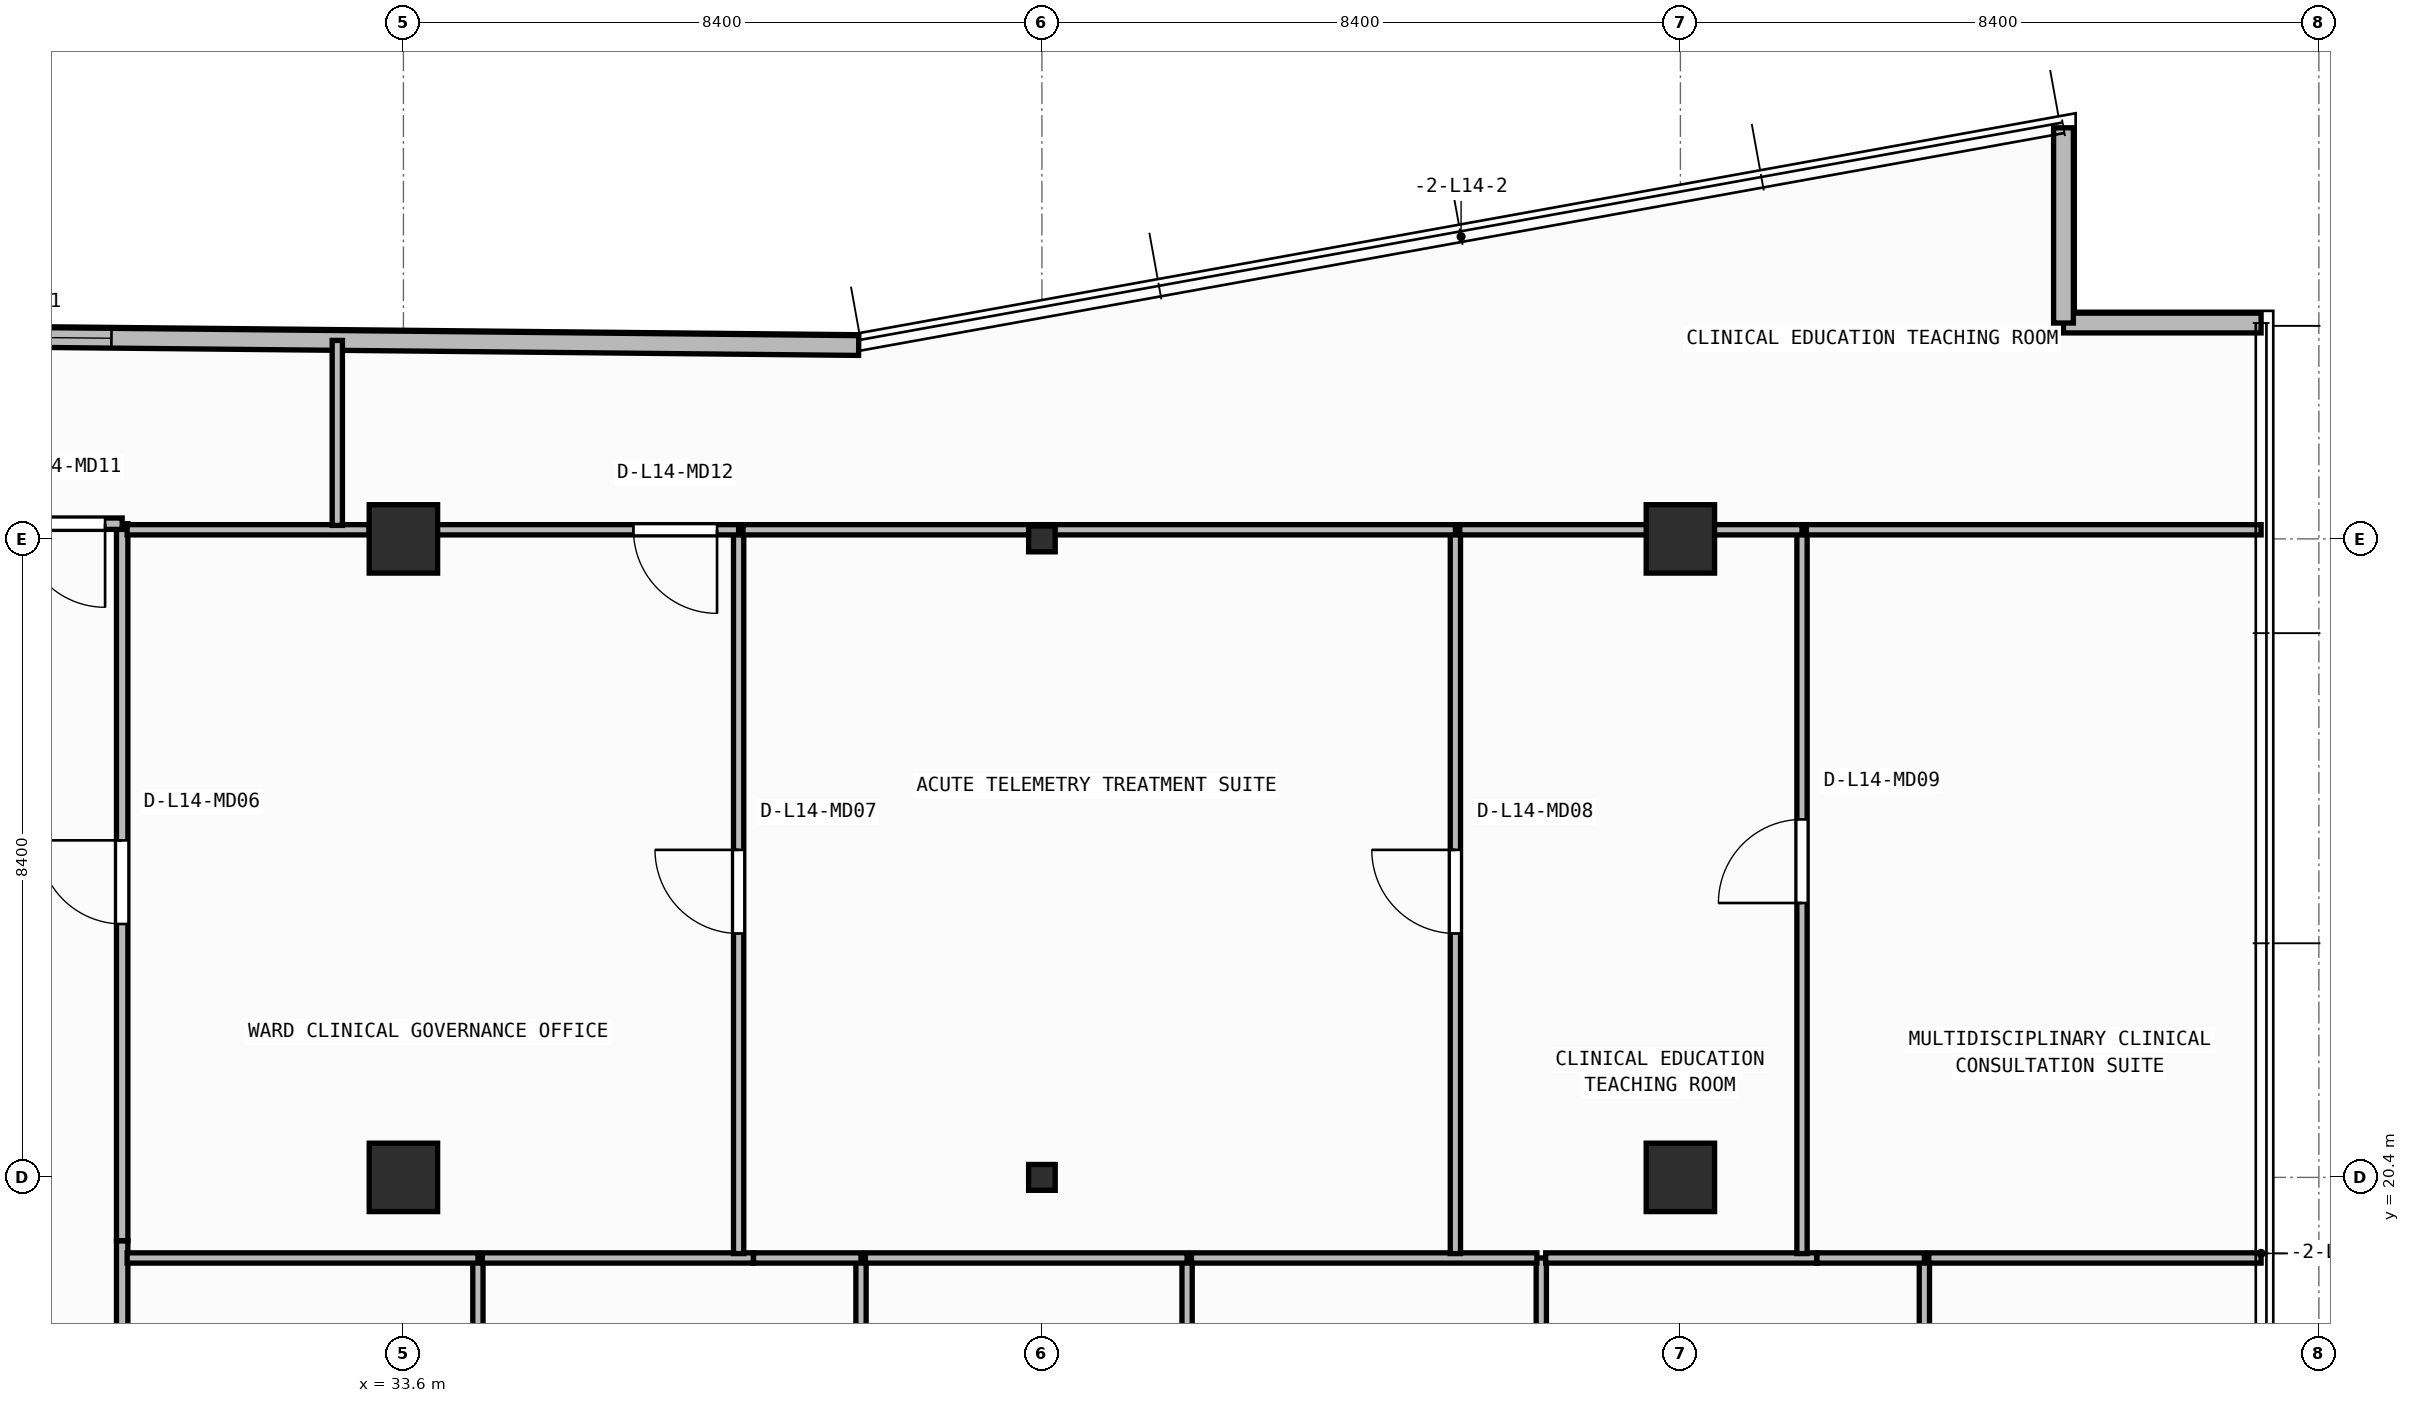
"""IFC4 building model, lengths in metres.
Left out: names, types, materials, properties, quantities, classifications, styles, units other than length and angle.
Written with IfcOpenShell. Run it as: python <this file> out.ifc"""

import sys

from ifc_helpers import new_model, si_unit, direction, frame, frame_2d, origin, origin_2d, place, context, subcontext, project, spatial, rectangle, i_section, extrude, element, fill, save


model = new_model("IFC4")
c1 = context("Model", 3, precision=1e-05, world=origin(), true_north=direction((0.0, 1.0)))
c2 = subcontext(c1, "Body", "Model", "MODEL_VIEW")
j1 = project(units=[si_unit("LENGTHUNIT", "METRE"), si_unit("PLANEANGLEUNIT", "RADIAN")], contexts=[c1])
p1 = place(None, origin())
s1 = spatial("IfcSite", under=j1, at=p1, CompositionType="ELEMENT")
p2 = place(p1, origin())
s2 = spatial("IfcBuilding", under=s1, at=p2, CompositionType="ELEMENT")
p3 = place(p2, frame((0.0, 0.0, 58.05)))
s3 = spatial("IfcBuildingStorey", under=s2, at=p3, CompositionType="ELEMENT", Elevation=58.05)
p4 = place(p3, frame((33.6, 20.4, 0.0), z_axis=(0.0, 0.0, 1.0), x_axis=(1.0, 0.0, 0.0)))
e1 = element("IfcColumn", 1, at=p4, inside=s3, PredefinedType="COLUMN", context=c2, shape_type="SweptSolid", body=[
    extrude(rectangle(XDim=0.9, YDim=0.9, at=origin_2d()), origin(), (0.0, 0.0, 1.0), 3.95),
])
p5 = place(p3, frame((42.0, 20.4, 0.0), z_axis=(0.0, 0.0, 1.0), x_axis=(1.0, 0.0, 0.0)))
e2 = element("IfcColumn", 2, at=p5, inside=s3, PredefinedType="COLUMN", context=c2, shape_type="SweptSolid", body=[
    extrude(i_section(OverallWidth=0.35, OverallDepth=0.34, WebThickness=0.016, FlangeThickness=0.028, at=origin_2d()), origin(), (0.0, 0.0, 1.0), 3.95),
])
for number, where, z_axis, x_axis in (
    (3, (50.4, 20.4, 0.0), (0.0, 0.0, 1.0), (1.0, 0.0, 0.0)),
    (4, (33.6, 28.8, 0.0), (0.0, 0.0, 1.0), (1.0, 0.0, 0.0)),
):
    element("IfcColumn", number, at=place(p3, frame(where, z_axis=z_axis, x_axis=x_axis)), inside=s3, PredefinedType="COLUMN", context=c2, shape_type="SweptSolid", body=[
        extrude(rectangle(XDim=0.9, YDim=0.9, at=origin_2d()), origin(), (0.0, 0.0, 1.0), 3.95),
    ])
p6 = place(p3, frame((42.0, 28.8, 0.0), z_axis=(0.0, 0.0, 1.0), x_axis=(1.0, 0.0, 0.0)))
e5 = element("IfcColumn", 5, at=p6, inside=s3, PredefinedType="COLUMN", context=c2, shape_type="SweptSolid", body=[
    extrude(i_section(OverallWidth=0.35, OverallDepth=0.34, WebThickness=0.016, FlangeThickness=0.028, at=origin_2d()), origin(), (0.0, 0.0, 1.0), 3.95),
])
p7 = place(p3, frame((50.4, 28.8, 0.0), z_axis=(0.0, 0.0, 1.0), x_axis=(1.0, 0.0, 0.0)))
e6 = element("IfcColumn", 6, at=p7, inside=s3, PredefinedType="COLUMN", context=c2, shape_type="SweptSolid", body=[
    extrude(rectangle(XDim=0.9, YDim=0.9, at=origin_2d()), origin(), (0.0, 0.0, 1.0), 3.95),
])
p8 = place(p3, frame((58.04, 31.64, 0.0), z_axis=(0.0, 0.0, 1.0), x_axis=(-1.0, 0.0, 0.0)))
e7 = element("IfcWall", 7, at=p8, inside=s3, PredefinedType="STANDARD", context=c2, shape_type="SweptSolid", body=[
    extrude(rectangle(XDim=2.6, YDim=0.26, at=frame_2d((1.3, 0.0))), origin(), (0.0, 0.0, 1.0), 3.71),
])
p9 = place(p3, frame((55.44, 31.64, 0.0), z_axis=(0.0, 0.0, 1.0), x_axis=(0.0, 1.0, 0.0)))
e8 = element("IfcWall", 8, at=p9, inside=s3, PredefinedType="STANDARD", context=c2, shape_type="SweptSolid", body=[
    extrude(rectangle(XDim=2.569, YDim=0.26, at=frame_2d((1.284, 0.0))), origin(), (0.0, 0.0, 1.0), 3.71),
])
p10 = place(p3, frame((39.59, 31.344, 0.0), z_axis=(0.0, 0.0, 1.0), x_axis=(-0.999952362926, 0.009760731435, 0.0)))
e9 = element("IfcWall", 9, at=p10, inside=s3, PredefinedType="STANDARD", context=c2, shape_type="SweptSolid", body=[
    extrude(rectangle(XDim=15.183, YDim=0.26, at=frame_2d((7.591, 0.0))), origin(), (0.0, 0.0, 1.0), 3.71),
])
p11 = place(p10, frame((9.831, 0.0, 0.9)))
e10 = element("IfcOpeningElement", 10, at=p11, cuts=e9, PredefinedType="OPENING", context=c2, shape_type="SweptSolid", body=[
    extrude(rectangle(XDim=2.4, YDim=1.65, at=frame_2d((1.2, 0.825))), frame((0.0, 0.14, 0.0), z_axis=(0.0, -1.0, 0.0), x_axis=(1.0, 0.0, 0.0)), (0.0, 0.0, 1.0), 0.28),
])
p12 = place(p3, frame((29.9, 17.814, 0.0), z_axis=(0.0, 0.0, 1.0), x_axis=(0.0, 1.0, 0.0)))
e11 = element("IfcWall", 11, at=p12, inside=s3, PredefinedType="PARTITIONING", context=c2, shape_type="SweptSolid", body=[
    extrude(rectangle(XDim=1.752, YDim=0.15, at=frame_2d((0.876, 0.0))), origin(), (0.0, 0.0, 1.0), 3.71),
])
p13 = place(p3, frame((29.9, 19.568, 0.0), z_axis=(0.0, 0.0, 1.0), x_axis=(0.0, 1.0, 0.0)))
e12 = element("IfcWall", 12, at=p13, inside=s3, PredefinedType="PARTITIONING", context=c2, shape_type="SweptSolid", body=[
    extrude(rectangle(XDim=9.432, YDim=0.15, at=frame_2d((4.716, 0.0))), origin(), (0.0, 0.0, 1.0), 3.71),
])
p14 = place(p13, frame((4.166, 0.0, 0.0)))
e13 = element("IfcOpeningElement", 13, at=p14, cuts=e12, PredefinedType="OPENING", context=c2, shape_type="SweptSolid", body=[
    extrude(rectangle(XDim=1.1, YDim=2.1, at=frame_2d((0.55, 1.05))), frame((0.0, 0.085, 0.0), z_axis=(0.0, -1.0, 0.0), x_axis=(1.0, 0.0, 0.0)), (0.0, 0.0, 1.0), 0.17),
])
p15 = place(p3, frame((29.9, 29.0, 0.0), z_axis=(0.0, 0.0, 1.0), x_axis=(-1.0, 0.0, 0.0)))
e14 = element("IfcWall", 14, at=p15, inside=s3, PredefinedType="PARTITIONING", context=c2, shape_type="SweptSolid", body=[
    extrude(rectangle(XDim=2.5, YDim=0.15, at=frame_2d((1.25, 0.0))), origin(), (0.0, 0.0, 1.0), 3.279),
])
p16 = place(p15, frame((0.225, 0.0, 0.0)))
e15 = element("IfcOpeningElement", 15, at=p16, cuts=e14, PredefinedType="OPENING", context=c2, shape_type="SweptSolid", body=[
    extrude(rectangle(XDim=1.1, YDim=2.1, at=frame_2d((0.55, 1.05))), frame((0.0, 0.085, 0.0), z_axis=(0.0, -1.0, 0.0), x_axis=(1.0, 0.0, 0.0)), (0.0, 0.0, 1.0), 0.17),
])
p17 = place(p3, frame((34.58, 17.833, 0.0), z_axis=(0.0, 0.0, 1.0), x_axis=(0.0, 1.0, 0.0)))
e16 = element("IfcWall", 16, at=p17, inside=s3, PredefinedType="PARTITIONING", context=c2, shape_type="SweptSolid", body=[
    extrude(rectangle(XDim=1.508, YDim=0.135, at=frame_2d((0.754, 0.0))), origin(), (0.0, 0.0, 1.0), 3.71),
])
p18 = place(p3, frame((34.58, 19.34, 0.0), z_axis=(0.0, 0.0, 1.0), x_axis=(-1.0, 0.0, 0.0)))
e17 = element("IfcWall", 17, at=p18, inside=s3, PredefinedType="PARTITIONING", context=c2, shape_type="SweptSolid", body=[
    extrude(rectangle(XDim=4.615, YDim=0.135, at=frame_2d((2.308, 0.0))), origin(), (0.0, 0.0, 1.0), 3.71),
])
p19 = place(p3, frame((39.62, 17.833, 0.0), z_axis=(0.0, 0.0, 1.0), x_axis=(0.0, 1.0, 0.0)))
e18 = element("IfcWall", 18, at=p19, inside=s3, PredefinedType="PARTITIONING", context=c2, shape_type="SweptSolid", body=[
    extrude(rectangle(XDim=1.508, YDim=0.135, at=frame_2d((0.754, 0.0))), origin(), (0.0, 0.0, 1.0), 3.71),
])
p20 = place(p3, frame((38.205, 19.34, 0.0), z_axis=(0.0, 0.0, 1.0), x_axis=(-1.0, 0.0, 0.0)))
e19 = element("IfcWall", 19, at=p20, inside=s3, PredefinedType="PARTITIONING", context=c2, shape_type="SweptSolid", body=[
    extrude(rectangle(XDim=3.567, YDim=0.135, at=frame_2d((1.784, 0.0))), origin(), (0.0, 0.0, 1.0), 3.71),
])
p21 = place(p3, frame((39.62, 19.34, 0.0), z_axis=(0.0, 0.0, 1.0), x_axis=(-1.0, 0.0, 0.0)))
e20 = element("IfcWall", 20, at=p21, inside=s3, PredefinedType="PARTITIONING", context=c2, shape_type="SweptSolid", body=[
    extrude(rectangle(XDim=1.414, YDim=0.135, at=frame_2d((0.707, 0.0))), origin(), (0.0, 0.0, 1.0), 3.71),
])
p22 = place(p3, frame((43.91, 17.833, 0.0), z_axis=(0.0, 0.0, 1.0), x_axis=(0.0, 1.0, 0.0)))
e21 = element("IfcWall", 21, at=p22, inside=s3, PredefinedType="PARTITIONING", context=c2, shape_type="SweptSolid", body=[
    extrude(rectangle(XDim=1.508, YDim=0.135, at=frame_2d((0.754, 0.0))), origin(), (0.0, 0.0, 1.0), 3.71),
])
p23 = place(p3, frame((43.91, 19.34, 0.0), z_axis=(0.0, 0.0, 1.0), x_axis=(-1.0, 0.0, 0.0)))
e22 = element("IfcWall", 22, at=p23, inside=s3, PredefinedType="PARTITIONING", context=c2, shape_type="SweptSolid", body=[
    extrude(rectangle(XDim=4.232, YDim=0.135, at=frame_2d((2.116, 0.0))), origin(), (0.0, 0.0, 1.0), 3.71),
])
p24 = place(p3, frame((48.57, 17.833, 0.0), z_axis=(0.0, 0.0, 1.0), x_axis=(0.0, 1.0, 0.0)))
e23 = element("IfcWall", 23, at=p24, inside=s3, PredefinedType="PARTITIONING", context=c2, shape_type="SweptSolid", body=[
    extrude(rectangle(XDim=1.508, YDim=0.135, at=frame_2d((0.754, 0.0))), origin(), (0.0, 0.0, 1.0), 3.71),
])
p25 = place(p3, frame((48.512, 19.34, 0.0), z_axis=(0.0, 0.0, 1.0), x_axis=(-1.0, 0.0, 0.0)))
e24 = element("IfcWall", 24, at=p25, inside=s3, PredefinedType="PARTITIONING", context=c2, shape_type="SweptSolid", body=[
    extrude(rectangle(XDim=4.545, YDim=0.135, at=frame_2d((2.272, 0.0))), origin(), (0.0, 0.0, 1.0), 3.71),
])
p26 = place(p3, frame((53.61, 17.833, 0.0), z_axis=(0.0, 0.0, 1.0), x_axis=(0.0, 1.0, 0.0)))
e25 = element("IfcWall", 25, at=p26, inside=s3, PredefinedType="PARTITIONING", context=c2, shape_type="SweptSolid", body=[
    extrude(rectangle(XDim=1.508, YDim=0.135, at=frame_2d((0.754, 0.0))), origin(), (0.0, 0.0, 1.0), 3.71),
])
p27 = place(p3, frame((52.195, 19.34, 0.0), z_axis=(0.0, 0.0, 1.0), x_axis=(-1.0, 0.0, 0.0)))
e26 = element("IfcWall", 26, at=p27, inside=s3, PredefinedType="PARTITIONING", context=c2, shape_type="SweptSolid", body=[
    extrude(rectangle(XDim=3.567, YDim=0.135, at=frame_2d((1.784, 0.0))), origin(), (0.0, 0.0, 1.0), 3.71),
])
p28 = place(p3, frame((53.61, 19.34, 0.0), z_axis=(0.0, 0.0, 1.0), x_axis=(-1.0, 0.0, 0.0)))
e27 = element("IfcWall", 27, at=p28, inside=s3, PredefinedType="PARTITIONING", context=c2, shape_type="SweptSolid", body=[
    extrude(rectangle(XDim=1.414, YDim=0.135, at=frame_2d((0.707, 0.0))), origin(), (0.0, 0.0, 1.0), 3.71),
])
p29 = place(p3, frame((58.04, 19.34, 0.0), z_axis=(0.0, 0.0, 1.0), x_axis=(-1.0, 0.0, 0.0)))
e28 = element("IfcWall", 28, at=p29, inside=s3, PredefinedType="PARTITIONING", context=c2, shape_type="SweptSolid", body=[
    extrude(rectangle(XDim=4.373, YDim=0.135, at=frame_2d((2.186, 0.0))), origin(), (0.0, 0.0, 1.0), 3.71),
])
p30 = place(p3, frame((38.01, 19.397, 0.0), z_axis=(0.0, 0.0, 1.0), x_axis=(0.0, 1.0, 0.0)))
e29 = element("IfcWall", 29, at=p30, inside=s3, PredefinedType="PARTITIONING", context=c2, shape_type="SweptSolid", body=[
    extrude(rectangle(XDim=9.522, YDim=0.135, at=frame_2d((4.761, 0.0))), origin(), (0.0, 0.0, 1.0), 3.71),
])
p31 = place(p30, frame((4.211, 0.0, 0.0)))
e30 = element("IfcOpeningElement", 30, at=p31, cuts=e29, PredefinedType="OPENING", context=c2, shape_type="SweptSolid", body=[
    extrude(rectangle(XDim=1.1, YDim=2.1, at=frame_2d((0.55, 1.05))), frame((0.0, 0.077, 0.0), z_axis=(0.0, -1.0, 0.0), x_axis=(1.0, 0.0, 0.0)), (0.0, 0.0, 1.0), 0.155),
])
p32 = place(p3, frame((33.15, 28.92, 0.0), z_axis=(0.0, 0.0, 1.0), x_axis=(-1.0, 0.0, 0.0)))
e31 = element("IfcWall", 31, at=p32, inside=s3, PredefinedType="PARTITIONING", context=c2, shape_type="SweptSolid", body=[
    extrude(rectangle(XDim=3.185, YDim=0.135, at=frame_2d((1.592, 0.0))), origin(), (0.0, 0.0, 1.0), 3.279),
])
p33 = place(p3, frame((38.01, 28.92, 0.0), z_axis=(0.0, 0.0, 1.0), x_axis=(-1.0, 0.0, 0.0)))
e32 = element("IfcWall", 32, at=p33, inside=s3, PredefinedType="PARTITIONING", context=c2, shape_type="SweptSolid", body=[
    extrude(rectangle(XDim=4.858, YDim=0.135, at=frame_2d((2.429, 0.0))), origin(), (0.0, 0.0, 1.0), 3.279),
])
p34 = place(p33, frame((0.284, 0.0, 0.0)))
e33 = element("IfcOpeningElement", 33, at=p34, cuts=e32, PredefinedType="OPENING", context=c2, shape_type="SweptSolid", body=[
    extrude(rectangle(XDim=1.1, YDim=2.1, at=frame_2d((0.55, 1.05))), frame((0.0, 0.077, 0.0), z_axis=(0.0, -1.0, 0.0), x_axis=(1.0, 0.0, 0.0)), (0.0, 0.0, 1.0), 0.155),
])
p35 = place(p3, frame((47.44, 19.397, 0.0), z_axis=(0.0, 0.0, 1.0), x_axis=(0.0, 1.0, 0.0)))
e34 = element("IfcWall", 34, at=p35, inside=s3, PredefinedType="PARTITIONING", context=c2, shape_type="SweptSolid", body=[
    extrude(rectangle(XDim=9.522, YDim=0.135, at=frame_2d((4.761, 0.0))), origin(), (0.0, 0.0, 1.0), 3.71),
])
p36 = place(p35, frame((4.211, 0.0, 0.0)))
e35 = element("IfcOpeningElement", 35, at=p36, cuts=e34, PredefinedType="OPENING", context=c2, shape_type="SweptSolid", body=[
    extrude(rectangle(XDim=1.1, YDim=2.1, at=frame_2d((0.55, 1.05))), frame((0.0, 0.077, 0.0), z_axis=(0.0, -1.0, 0.0), x_axis=(1.0, 0.0, 0.0)), (0.0, 0.0, 1.0), 0.155),
])
p37 = place(p3, frame((47.44, 28.92, 0.0), z_axis=(0.0, 0.0, 1.0), x_axis=(-1.0, 0.0, 0.0)))
e36 = element("IfcWall", 36, at=p37, inside=s3, PredefinedType="PARTITIONING", context=c2, shape_type="SweptSolid", body=[
    extrude(rectangle(XDim=9.373, YDim=0.135, at=frame_2d((4.686, 0.0))), origin(), (0.0, 0.0, 1.0), 3.073),
])
p38 = place(p3, frame((52.0, 19.397, 0.0), z_axis=(0.0, 0.0, 1.0), x_axis=(0.0, 1.0, 0.0)))
e37 = element("IfcWall", 37, at=p38, inside=s3, PredefinedType="PARTITIONING", context=c2, shape_type="SweptSolid", body=[
    extrude(rectangle(XDim=9.522, YDim=0.135, at=frame_2d((4.761, 0.0))), origin(), (0.0, 0.0, 1.0), 3.71),
])
p39 = place(p38, frame((4.612, 0.0, 0.0)))
e38 = element("IfcOpeningElement", 38, at=p39, cuts=e37, PredefinedType="OPENING", context=c2, shape_type="SweptSolid", body=[
    extrude(rectangle(XDim=1.1, YDim=2.1, at=frame_2d((0.55, 1.05))), frame((0.0, 0.077, 0.0), z_axis=(0.0, -1.0, 0.0), x_axis=(1.0, 0.0, 0.0)), (0.0, 0.0, 1.0), 0.155),
])
p40 = place(p3, frame((52.0, 28.92, 0.0), z_axis=(0.0, 0.0, 1.0), x_axis=(-1.0, 0.0, 0.0)))
e39 = element("IfcWall", 39, at=p40, inside=s3, PredefinedType="PARTITIONING", context=c2, shape_type="SweptSolid", body=[
    extrude(rectangle(XDim=4.502, YDim=0.135, at=frame_2d((2.251, 0.0))), origin(), (0.0, 0.0, 1.0), 3.073),
])
p41 = place(p3, frame((58.04, 28.92, 0.0), z_axis=(0.0, 0.0, 1.0), x_axis=(-1.0, 0.0, 0.0)))
e40 = element("IfcWall", 40, at=p41, inside=s3, PredefinedType="PARTITIONING", context=c2, shape_type="SweptSolid", body=[
    extrude(rectangle(XDim=5.982, YDim=0.135, at=frame_2d((2.991, 0.0))), origin(), (0.0, 0.0, 1.0), 3.71),
])
p42 = place(p3, frame((32.73, 28.978, 0.0), z_axis=(0.0, 0.0, 1.0), x_axis=(0.0, 1.0, 0.0)))
e41 = element("IfcWall", 41, at=p42, inside=s3, PredefinedType="PARTITIONING", context=c2, shape_type="SweptSolid", body=[
    extrude(rectangle(XDim=2.433, YDim=0.135, at=frame_2d((1.217, 0.0))), origin(), (0.0, 0.0, 1.0), 3.71),
])
p43 = place(p11, origin())
e42 = element("IfcWindow", 42, at=p43, inside=s3, PartitioningType="SINGLE_PANEL", PredefinedType="WINDOW", context=c2, shape_type="SweptSolid", body=[
    extrude(rectangle(XDim=2.4, YDim=1.65, at=frame_2d((1.2, 0.825))), frame((0.0, 0.03, 0.0), z_axis=(0.0, -1.0, 0.0), x_axis=(1.0, 0.0, 0.0)), (0.0, 0.0, 1.0), 0.06),
])
fill(e10, e42)
p44 = place(p14, origin())
e43 = element("IfcDoor", 43, at=p44, inside=s3, OperationType="SINGLE_SWING_RIGHT", PredefinedType="DOOR", context=c2, shape_type="SweptSolid", body=[
    extrude(rectangle(XDim=1.1, YDim=2.1, at=frame_2d((0.55, 1.05))), frame((0.0, 0.025, 0.0), z_axis=(0.0, -1.0, 0.0), x_axis=(1.0, 0.0, 0.0)), (0.0, 0.0, 1.0), 0.05),
])
fill(e13, e43)
p45 = place(p16, origin())
e44 = element("IfcDoor", 44, at=p45, inside=s3, OperationType="SINGLE_SWING_LEFT", PredefinedType="DOOR", context=c2, shape_type="SweptSolid", body=[
    extrude(rectangle(XDim=1.1, YDim=2.1, at=frame_2d((0.55, 1.05))), frame((0.0, 0.025, 0.0), z_axis=(0.0, -1.0, 0.0), x_axis=(1.0, 0.0, 0.0)), (0.0, 0.0, 1.0), 0.05),
])
fill(e15, e44)
p46 = place(p31, origin())
e45 = element("IfcDoor", 45, at=p46, inside=s3, OperationType="SINGLE_SWING_RIGHT", PredefinedType="DOOR", context=c2, shape_type="SweptSolid", body=[
    extrude(rectangle(XDim=1.1, YDim=2.1, at=frame_2d((0.55, 1.05))), frame((0.0, 0.025, 0.0), z_axis=(0.0, -1.0, 0.0), x_axis=(1.0, 0.0, 0.0)), (0.0, 0.0, 1.0), 0.05),
])
fill(e30, e45)
p47 = place(p34, origin())
e46 = element("IfcDoor", 46, at=p47, inside=s3, OperationType="SINGLE_SWING_LEFT", PredefinedType="DOOR", context=c2, shape_type="SweptSolid", body=[
    extrude(rectangle(XDim=1.1, YDim=2.1, at=frame_2d((0.55, 1.05))), frame((0.0, 0.025, 0.0), z_axis=(0.0, -1.0, 0.0), x_axis=(1.0, 0.0, 0.0)), (0.0, 0.0, 1.0), 0.05),
])
fill(e33, e46)
p48 = place(p36, origin())
e47 = element("IfcDoor", 47, at=p48, inside=s3, OperationType="SINGLE_SWING_RIGHT", PredefinedType="DOOR", context=c2, shape_type="SweptSolid", body=[
    extrude(rectangle(XDim=1.1, YDim=2.1, at=frame_2d((0.55, 1.05))), frame((0.0, 0.025, 0.0), z_axis=(0.0, -1.0, 0.0), x_axis=(1.0, 0.0, 0.0)), (0.0, 0.0, 1.0), 0.05),
])
fill(e35, e47)
p49 = place(p39, origin())
e48 = element("IfcDoor", 48, at=p49, inside=s3, OperationType="SINGLE_SWING_LEFT", PredefinedType="DOOR", context=c2, shape_type="SweptSolid", body=[
    extrude(rectangle(XDim=1.1, YDim=2.1, at=frame_2d((0.55, 1.05))), frame((0.0, 0.025, 0.0), z_axis=(0.0, -1.0, 0.0), x_axis=(1.0, 0.0, 0.0)), (0.0, 0.0, 1.0), 0.05),
])
fill(e38, e48)
save(model, sys.argv[1])
